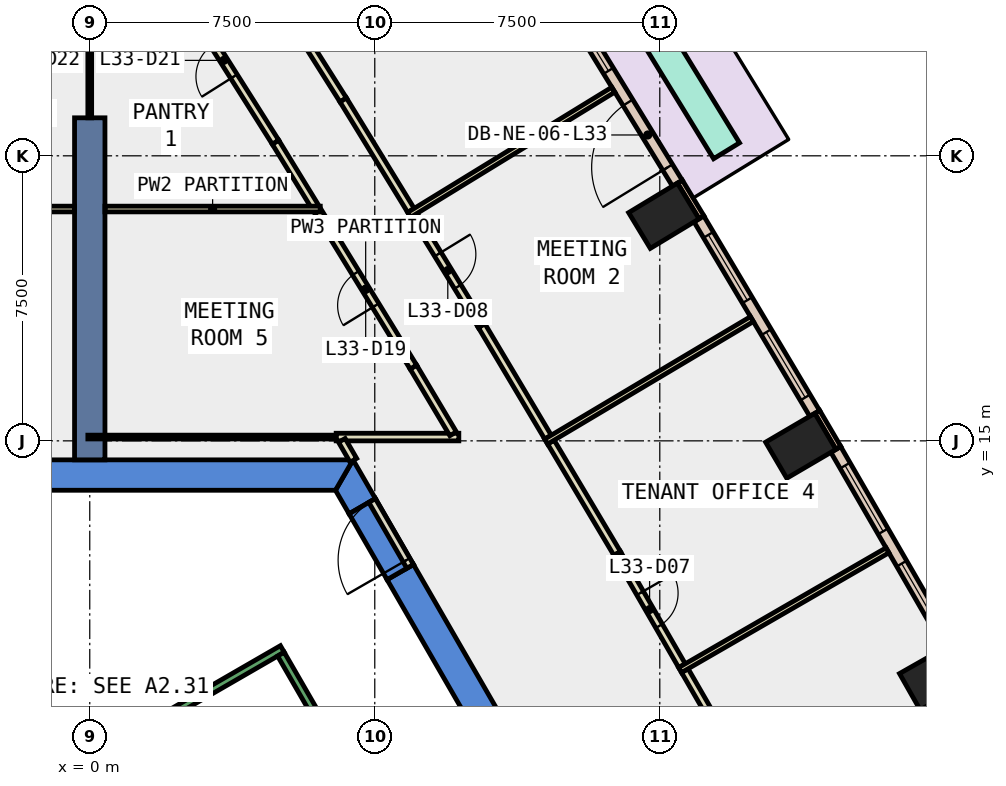
"""IFC4 building model, lengths in metres.
Left out: names, types, materials, properties, quantities, classifications, styles, units other than length and angle.
Written with IfcOpenShell. Run it as: python <this file> out.ifc"""

import sys

from ifc_helpers import new_model, si_unit, direction, frame, frame_2d, origin, origin_2d, place, context, subcontext, project, spatial, polyline, rectangle, outline, extrude, element, fill, save


model = new_model("IFC4")
c1 = context("Model", 3, precision=1e-05, world=origin(), true_north=direction((0.0, 1.0)))
c2 = subcontext(c1, "Body", "Model", "MODEL_VIEW")
j1 = project(units=[si_unit("LENGTHUNIT", "METRE"), si_unit("PLANEANGLEUNIT", "RADIAN")], contexts=[c1])
p1 = place(None, origin())
s1 = spatial("IfcSite", under=j1, at=p1, CompositionType="ELEMENT")
p2 = place(p1, origin())
s2 = spatial("IfcBuilding", under=s1, at=p2, CompositionType="ELEMENT")
p3 = place(p2, frame((0.0, 0.0, 150.8)))
s3 = spatial("IfcBuildingStorey", under=s2, at=p3, CompositionType="ELEMENT", Elevation=150.8)
for number, where, z_axis, x_axis in (
    (1, (22.232, 8.769, -0.4), (0.0, 0.0, 1.0), (-0.494, 0.869, 0.0)),
    (2, (18.71, 14.87, -0.4), (0.0, 0.0, 1.0), (-0.506, 0.863, 0.0)),
    (3, (15.107, 20.923, -0.4), (0.0, 0.0, 1.0), (-0.518, 0.855, 0.0)),
):
    element("IfcColumn", number, at=place(p3, frame(where, z_axis=z_axis, x_axis=x_axis)), inside=s3, PredefinedType="COLUMN", context=c2, shape_type="SweptSolid", body=[
        extrude(rectangle(XDim=1.1, YDim=1.5, at=origin_2d()), origin(), (0.0, 0.0, 1.0), 4.2),
    ])
p4 = place(p3, frame((0.0, 0.0, -0.4)))
e4 = element("IfcWall", 4, at=p4, inside=s3, PredefinedType="SHEAR", context=c2, shape_type="SweptSolid", body=[
    extrude(outline(polyline([(8.517, 11.748), (7.824, 11.348), (12.933, 2.5), (13.856, 2.5), (8.517, 11.748)])), origin(), (0.0, 0.0, 1.0), 4.2),
])
p5 = place(p3, frame((0.0, 0.0, -0.4)))
e5 = element("IfcWall", 5, at=p5, inside=s3, PredefinedType="SHEAR", context=c2, shape_type="SweptSolid", body=[
    extrude(outline(polyline([(6.824, 13.08), (7.517, 13.48), (6.928, 14.5), (6.466, 13.7), (6.824, 13.08)])), origin(), (0.0, 0.0, 1.0), 4.2),
])
p6 = place(p3, frame((0.0, 0.0, 3.6)))
e6 = element("IfcWall", 6, at=p6, inside=s3, PredefinedType="SHEAR", context=c2, shape_type="SweptSolid", body=[
    extrude(outline(polyline([(7.517, 13.48), (6.824, 13.08), (7.824, 11.348), (8.517, 11.748), (7.517, 13.48)])), origin(), (0.0, 0.0, 1.0), 0.2),
])
p7 = place(p3, frame((0.0, 0.0, -0.4)))
e7 = element("IfcWall", 7, at=p7, inside=s3, PredefinedType="SHEAR", context=c2, shape_type="SweptSolid", body=[
    extrude(outline(polyline([(6.928, 14.5), (-6.928, 14.5), (-6.466, 13.7), (6.466, 13.7), (6.928, 14.5)])), origin(), (0.0, 0.0, 1.0), 4.2),
])
p8 = place(p3, frame((0.0, 14.5, -0.4), z_axis=(0.0, 0.0, 1.0), x_axis=(0.0, 1.0, 0.0)))
e8 = element("IfcWall", 8, at=p8, inside=s3, PredefinedType="SHEAR", context=c2, shape_type="SweptSolid", body=[
    extrude(rectangle(XDim=9.0, YDim=0.8, at=frame_2d((4.5, 0.0))), origin(), (0.0, 0.0, 1.0), 4.2),
])
p9 = place(p3, frame((19.7, 14.813, 0.0), z_axis=(0.0, 0.0, 1.0), x_axis=(-0.506505715302, 0.862236603472, 0.0)))
e9 = element("IfcWall", 9, at=p9, inside=s3, PredefinedType="STANDARD", context=c2, shape_type="SweptSolid", body=[
    extrude(rectangle(XDim=1.099, YDim=0.15, at=frame_2d((0.55, 0.0))), origin(), (0.0, 0.0, 1.0), 3.8),
])
p10 = place(p3, frame((16.098, 20.88, 0.0), z_axis=(0.0, 0.0, 1.0), x_axis=(-0.517918067967, 0.85543022794, 0.0)))
e10 = element("IfcWall", 10, at=p10, inside=s3, PredefinedType="STANDARD", context=c2, shape_type="SweptSolid", body=[
    extrude(rectangle(XDim=1.1, YDim=0.15, at=frame_2d((0.55, 0.0))), origin(), (0.0, 0.0, 1.0), 3.8),
])
p11 = place(p3, frame((22.61, 9.615, 0.0), z_axis=(0.0, 0.0, 1.0), x_axis=(-0.500061823953, 0.865989706766, 0.0)))
e11 = element("IfcWall", 11, at=p11, inside=s3, PredefinedType="STANDARD", context=c2, shape_type="SweptSolid", body=[
    extrude(rectangle(XDim=5.957, YDim=0.3, at=frame_2d((2.979, 0.0))), origin(), (0.0, 0.0, 1.0), 3.8),
])
p12 = place(p11, frame((0.489, 0.0, 0.9)))
e12 = element("IfcOpeningElement", 12, at=p12, cuts=e11, PredefinedType="OPENING", context=c2, shape_type="SweptSolid", body=[
    extrude(rectangle(XDim=2.0, YDim=2.6, at=frame_2d((1.0, 1.3))), frame((0.0, 0.16, 0.0), z_axis=(0.0, -1.0, 0.0), x_axis=(1.0, 0.0, 0.0)), (0.0, 0.0, 1.0), 0.32),
])
p13 = place(p11, frame((3.468, 0.0, 0.9)))
e13 = element("IfcOpeningElement", 13, at=p13, cuts=e11, PredefinedType="OPENING", context=c2, shape_type="SweptSolid", body=[
    extrude(rectangle(XDim=2.0, YDim=2.6, at=frame_2d((1.0, 1.3))), frame((0.0, 0.16, 0.0), z_axis=(0.0, -1.0, 0.0), x_axis=(1.0, 0.0, 0.0)), (0.0, 0.0, 1.0), 0.32),
])
p14 = place(p3, frame((19.076, 15.721, 0.0), z_axis=(0.0, 0.0, 1.0), x_axis=(-0.511455040009, 0.859310038374, 0.0)))
e14 = element("IfcWall", 14, at=p14, inside=s3, PredefinedType="STANDARD", context=c2, shape_type="SweptSolid", body=[
    extrude(rectangle(XDim=5.957, YDim=0.3, at=frame_2d((2.979, 0.0))), origin(), (0.0, 0.0, 1.0), 3.8),
])
p15 = place(p14, frame((0.489, 0.0, 0.9)))
e15 = element("IfcOpeningElement", 15, at=p15, cuts=e14, PredefinedType="OPENING", context=c2, shape_type="SweptSolid", body=[
    extrude(rectangle(XDim=2.0, YDim=2.6, at=frame_2d((1.0, 1.3))), frame((0.0, 0.16, 0.0), z_axis=(0.0, -1.0, 0.0), x_axis=(1.0, 0.0, 0.0)), (0.0, 0.0, 1.0), 0.32),
])
p16 = place(p14, frame((3.468, 0.0, 0.9)))
e16 = element("IfcOpeningElement", 16, at=p16, cuts=e14, PredefinedType="OPENING", context=c2, shape_type="SweptSolid", body=[
    extrude(rectangle(XDim=2.0, YDim=2.6, at=frame_2d((1.0, 1.3))), frame((0.0, 0.16, 0.0), z_axis=(0.0, -1.0, 0.0), x_axis=(1.0, 0.0, 0.0)), (0.0, 0.0, 1.0), 0.32),
])
p17 = place(p3, frame((15.462, 21.779, 0.0), z_axis=(0.0, 0.0, 1.0), x_axis=(-0.522704272908, 0.852514072074, 0.0)))
e17 = element("IfcWall", 17, at=p17, inside=s3, PredefinedType="STANDARD", context=c2, shape_type="SweptSolid", body=[
    extrude(rectangle(XDim=5.958, YDim=0.3, at=frame_2d((2.979, 0.0))), origin(), (0.0, 0.0, 1.0), 3.8),
])
p18 = place(p17, frame((0.489, 0.0, 0.0)))
e18 = element("IfcOpeningElement", 18, at=p18, cuts=e17, PredefinedType="OPENING", context=c2, shape_type="SweptSolid", body=[
    extrude(rectangle(XDim=2.0, YDim=2.4, at=frame_2d((1.0, 1.2))), frame((0.0, 0.16, 0.0), z_axis=(0.0, -1.0, 0.0), x_axis=(1.0, 0.0, 0.0)), (0.0, 0.0, 1.0), 0.32),
])
p19 = place(p17, frame((3.468, 0.0, 0.9)))
e19 = element("IfcOpeningElement", 19, at=p19, cuts=e17, PredefinedType="OPENING", context=c2, shape_type="SweptSolid", body=[
    extrude(rectangle(XDim=2.0, YDim=2.6, at=frame_2d((1.0, 1.3))), frame((0.0, 0.16, 0.0), z_axis=(0.0, -1.0, 0.0), x_axis=(1.0, 0.0, 0.0)), (0.0, 0.0, 1.0), 0.32),
])
p20 = place(p3, frame((16.757, 22.632, 0.0), z_axis=(0.0, 0.0, 1.0), x_axis=(-0.52278978303, 0.852461637119, 0.0)))
e20 = element("IfcWall", 20, at=p20, inside=s3, PredefinedType="STANDARD", context=c2, shape_type="SweptSolid", body=[
    extrude(rectangle(XDim=5.857, YDim=0.8, at=frame_2d((2.929, 0.0))), origin(), (0.0, 0.0, 1.0), 0.8),
])
p21 = place(p3, frame((6.484, 15.1, 0.0), z_axis=(0.0, 0.0, 1.0), x_axis=(1.0, 0.0, 0.0)))
e21 = element("IfcWall", 21, at=p21, inside=s3, PredefinedType="PARTITIONING", context=c2, shape_type="SweptSolid", body=[
    extrude(rectangle(XDim=3.228, YDim=0.2, at=frame_2d((1.614, 0.0))), origin(), (0.0, 0.0, 1.0), 3.8),
])
p22 = place(p3, frame((9.561, 15.186, 0.0), z_axis=(0.0, 0.0, 1.0), x_axis=(-0.511399832047, 0.859342895346, 0.0)))
e22 = element("IfcWall", 22, at=p22, inside=s3, PredefinedType="PARTITIONING", context=c2, shape_type="SweptSolid", body=[
    extrude(rectangle(XDim=2.043, YDim=0.2, at=frame_2d((1.021, 0.0))), origin(), (0.0, 0.0, 1.0), 3.8),
])
p23 = place(p3, frame((8.516, 16.942, 0.0), z_axis=(0.0, 0.0, 1.0), x_axis=(-0.522865983217, 0.852414901086, 0.0)))
e23 = element("IfcWall", 23, at=p23, inside=s3, PredefinedType="PARTITIONING", context=c2, shape_type="SweptSolid", body=[
    extrude(rectangle(XDim=4.803, YDim=0.2, at=frame_2d((2.401, 0.0))), origin(), (0.0, 0.0, 1.0), 3.8),
])
p24 = place(p23, frame((1.901, 0.0, 0.0)))
e24 = element("IfcOpeningElement", 24, at=p24, cuts=e23, PredefinedType="OPENING", context=c2, shape_type="SweptSolid", body=[
    extrude(rectangle(XDim=1.0, YDim=2.1, at=frame_2d((0.5, 1.05))), frame((0.0, 0.11, 0.0), z_axis=(0.0, -1.0, 0.0), x_axis=(1.0, 0.0, 0.0)), (0.0, 0.0, 1.0), 0.22),
])
p25 = place(p3, frame((6.937, 14.488, 0.0), z_axis=(0.0, 0.0, 1.0), x_axis=(-0.499908430952, 0.866078264744, 0.0)))
e25 = element("IfcWall", 25, at=p25, inside=s3, PredefinedType="PARTITIONING", context=c2, shape_type="SweptSolid", body=[
    extrude(rectangle(XDim=0.606, YDim=0.2, at=frame_2d((0.303, 0.0))), origin(), (0.0, 0.0, 1.0), 3.8),
])
p26 = place(p3, frame((5.927, 21.164, 0.0), z_axis=(0.0, 0.0, 1.0), x_axis=(-0.522754838565, 0.852483066552, 0.0)))
e26 = element("IfcWall", 26, at=p26, inside=s3, PredefinedType="PARTITIONING", context=c2, shape_type="SweptSolid", body=[
    extrude(rectangle(XDim=1.99, YDim=0.2, at=frame_2d((0.995, 0.0))), origin(), (0.0, 0.0, 1.0), 3.8),
])
p27 = place(p3, frame((4.887, 22.86, 0.0), z_axis=(0.0, 0.0, 1.0), x_axis=(-0.534315942524, 0.845284847589, 0.0)))
e27 = element("IfcWall", 27, at=p27, inside=s3, PredefinedType="PARTITIONING", context=c2, shape_type="SweptSolid", body=[
    extrude(rectangle(XDim=5.091, YDim=0.2, at=frame_2d((2.545, 0.0))), origin(), (0.0, 0.0, 1.0), 3.8),
])
p28 = place(p27, frame((2.045, 0.0, 0.0)))
e28 = element("IfcOpeningElement", 28, at=p28, cuts=e27, PredefinedType="OPENING", context=c2, shape_type="SweptSolid", body=[
    extrude(rectangle(XDim=1.0, YDim=2.1, at=frame_2d((0.5, 1.05))), frame((0.0, 0.11, 0.0), z_axis=(0.0, -1.0, 0.0), x_axis=(1.0, 0.0, 0.0)), (0.0, 0.0, 1.0), 0.22),
])
p29 = place(p3, frame((15.659, 8.954, 0.0), z_axis=(0.0, 0.0, 1.0), x_axis=(0.50001992892, -0.866013897511, 0.0)))
e29 = element("IfcWall", 29, at=p29, inside=s3, PredefinedType="PARTITIONING", context=c2, shape_type="SweptSolid", body=[
    extrude(rectangle(XDim=3.41, YDim=0.2, at=frame_2d((1.705, 0.0))), origin(), (0.0, 0.0, 1.0), 3.8),
])
p30 = place(p3, frame((12.134, 14.968, 0.0), z_axis=(0.0, 0.0, 1.0), x_axis=(0.511545516492, -0.859256180983, 0.0)))
e30 = element("IfcWall", 30, at=p30, inside=s3, PredefinedType="PARTITIONING", context=c2, shape_type="SweptSolid", body=[
    extrude(rectangle(XDim=3.411, YDim=0.2, at=frame_2d((1.706, 0.0))), origin(), (0.0, 0.0, 1.0), 3.8),
])
p31 = place(p3, frame((13.879, 12.037, 0.0), z_axis=(0.0, 0.0, 1.0), x_axis=(0.50001992892, -0.866013897511, 0.0)))
e31 = element("IfcWall", 31, at=p31, inside=s3, PredefinedType="PARTITIONING", context=c2, shape_type="SweptSolid", body=[
    extrude(rectangle(XDim=3.41, YDim=0.2, at=frame_2d((1.705, 0.0))), origin(), (0.0, 0.0, 1.0), 3.8),
])
p32 = place(p31, frame((1.205, 0.0, 0.0)))
e32 = element("IfcOpeningElement", 32, at=p32, cuts=e31, PredefinedType="OPENING", context=c2, shape_type="SweptSolid", body=[
    extrude(rectangle(XDim=1.0, YDim=2.1, at=frame_2d((0.5, 1.05))), frame((0.0, 0.11, 0.0), z_axis=(0.0, -1.0, 0.0), x_axis=(1.0, 0.0, 0.0)), (0.0, 0.0, 1.0), 0.22),
])
p33 = place(p3, frame((8.53, 20.935, 0.0), z_axis=(0.0, 0.0, 1.0), x_axis=(0.522830634433, -0.852436582801, 0.0)))
e33 = element("IfcWall", 33, at=p33, inside=s3, PredefinedType="PARTITIONING", context=c2, shape_type="SweptSolid", body=[
    extrude(rectangle(XDim=3.41, YDim=0.2, at=frame_2d((1.705, 0.0))), origin(), (0.0, 0.0, 1.0), 3.8),
])
p34 = place(p33, frame((1.205, 0.0, 0.0)))
e34 = element("IfcOpeningElement", 34, at=p34, cuts=e33, PredefinedType="OPENING", context=c2, shape_type="SweptSolid", body=[
    extrude(rectangle(XDim=1.0, YDim=2.1, at=frame_2d((0.5, 1.05))), frame((0.0, 0.11, 0.0), z_axis=(0.0, -1.0, 0.0), x_axis=(1.0, 0.0, 0.0)), (0.0, 0.0, 1.0), 0.22),
])
p35 = place(p3, frame((10.313, 18.028, 0.0), z_axis=(0.0, 0.0, 1.0), x_axis=(0.511566898838, -0.859243450958, 0.0)))
e35 = element("IfcWall", 35, at=p35, inside=s3, PredefinedType="PARTITIONING", context=c2, shape_type="SweptSolid", body=[
    extrude(rectangle(XDim=3.411, YDim=0.2, at=frame_2d((1.706, 0.0))), origin(), (0.0, 0.0, 1.0), 3.8),
])
p36 = place(p3, frame((3.209, 29.446, 0.0), z_axis=(0.0, 0.0, 1.0), x_axis=(0.534253865926, -0.845324083854, 0.0)))
e36 = element("IfcWall", 36, at=p36, inside=s3, PredefinedType="PARTITIONING", context=c2, shape_type="SweptSolid", body=[
    extrude(rectangle(XDim=6.478, YDim=0.2, at=frame_2d((3.239, 0.0))), origin(), (0.0, 0.0, 1.0), 3.8),
])
p37 = place(p36, frame((2.739, 0.0, 0.0)))
e37 = element("IfcOpeningElement", 37, at=p37, cuts=e36, PredefinedType="OPENING", context=c2, shape_type="SweptSolid", body=[
    extrude(rectangle(XDim=1.0, YDim=2.1, at=frame_2d((0.5, 1.05))), frame((0.0, 0.11, 0.0), z_axis=(0.0, -1.0, 0.0), x_axis=(1.0, 0.0, 0.0)), (0.0, 0.0, 1.0), 0.22),
])
p38 = place(p3, frame((6.67, 23.97, 0.0), z_axis=(0.0, 0.0, 1.0), x_axis=(0.522622501212, -0.85256420358, 0.0)))
e38 = element("IfcWall", 38, at=p38, inside=s3, PredefinedType="PARTITIONING", context=c2, shape_type="SweptSolid", body=[
    extrude(rectangle(XDim=3.41, YDim=0.2, at=frame_2d((1.705, 0.0))), origin(), (0.0, 0.0, 1.0), 3.8),
])
p39 = place(p3, frame((6.484, 15.1, 0.0), z_axis=(0.0, 0.0, 1.0), x_axis=(-1.0, 0.0, 0.0)))
e39 = element("IfcWall", 39, at=p39, inside=s3, PredefinedType="PARTITIONING", context=c2, shape_type="SweptSolid", body=[
    extrude(rectangle(XDim=6.534, YDim=0.1, at=frame_2d((3.267, 0.0))), origin(), (0.0, 0.0, 1.0), 3.8),
])
for number, where, z_axis, x_axis in (
    (40, (0.4, 21.1, 0.0), (0.0, 0.0, 1.0), (1.0, 0.0, 0.0)),
    (41, (-6.066, 21.1, 0.0), (0.0, 0.0, 1.0), (1.0, 0.0, 0.0)),
):
    element("IfcWall", number, at=place(p3, frame(where, z_axis=z_axis, x_axis=x_axis)), inside=s3, PredefinedType="PARTITIONING", context=c2, shape_type="SweptSolid", body=[
        extrude(rectangle(XDim=5.666, YDim=0.15, at=frame_2d((2.833, 0.0))), origin(), (0.0, 0.0, 1.0), 3.8),
    ])
p40 = place(p3, frame((0.0, 23.5, 0.0), z_axis=(0.0, 0.0, 1.0), x_axis=(0.0, 1.0, 0.0)))
e42 = element("IfcWall", 42, at=p40, inside=s3, PredefinedType="PARTITIONING", context=c2, shape_type="SweptSolid", body=[
    extrude(rectangle(XDim=3.675, YDim=0.1, at=frame_2d((1.837, 0.0))), origin(), (0.0, 0.0, 1.0), 3.8),
])
p41 = place(p3, frame((15.535, 8.969, 0.0), z_axis=(0.0, 0.0, 1.0), x_axis=(0.865951968193, 0.500127172609, 0.0)))
e43 = element("IfcWall", 43, at=p41, inside=s3, PredefinedType="PARTITIONING", context=c2, shape_type="SweptSolid", body=[
    extrude(rectangle(XDim=6.301, YDim=0.15, at=frame_2d((3.15, 0.0))), origin(), (0.0, 0.0, 1.0), 3.8),
])
for number, where, z_axis, x_axis in (
    (44, (12.01, 14.981, 0.0), (0.0, 0.0, 1.0), (0.859, 0.511, 0.0)),
    (45, (8.406, 20.947, 0.0), (0.0, 0.0, 1.0), (0.853, 0.523, 0.0)),
):
    element("IfcWall", number, at=place(p3, frame(where, z_axis=z_axis, x_axis=x_axis)), inside=s3, PredefinedType="PARTITIONING", context=c2, shape_type="SweptSolid", body=[
        extrude(rectangle(XDim=6.3, YDim=0.15, at=frame_2d((3.15, 0.0))), origin(), (0.0, 0.0, 1.0), 3.8),
    ])
p42 = place(p3, frame((8.43, 11.698, 0.0), z_axis=(0.0, 0.0, 1.0), x_axis=(-0.50002537861, 0.866010750942, 0.0)))
e46 = element("IfcWall", 46, at=p42, inside=s3, PredefinedType="PARTITIONING", context=c2, shape_type="SweptSolid", body=[
    extrude(rectangle(XDim=2.0, YDim=0.2, at=frame_2d((1.0, 0.0))), origin(), (0.0, 0.0, 1.0), 2.4),
])
p43 = place(p42, frame((0.19, 0.0, 0.0)))
e47 = element("IfcOpeningElement", 47, at=p43, cuts=e46, PredefinedType="OPENING", context=c2, shape_type="SweptSolid", body=[
    extrude(rectangle(XDim=1.8, YDim=2.1, at=frame_2d((0.9, 1.05))), frame((0.0, 0.11, 0.0), z_axis=(0.0, -1.0, 0.0), x_axis=(1.0, 0.0, 0.0)), (0.0, 0.0, 1.0), 0.22),
])
p44 = place(p3, frame((1.256, 7.324, 0.0), z_axis=(0.0, 0.0, 1.0), x_axis=(0.866046073146, 0.499964197906, 0.0)))
e48 = element("IfcWall", 48, at=p44, inside=s3, PredefinedType="STANDARD", context=c2, shape_type="SweptSolid", body=[
    extrude(rectangle(XDim=4.4, YDim=0.2, at=frame_2d((2.2, 0.0))), origin(), (0.0, 0.0, 1.0), 3.8),
])
p45 = place(p3, frame((8.48, 3.412, 0.0), z_axis=(0.0, 0.0, 1.0), x_axis=(-0.499978703459, 0.866037698999, 0.0)))
e49 = element("IfcWall", 49, at=p45, inside=s3, PredefinedType="STANDARD", context=c2, shape_type="SweptSolid", body=[
    extrude(rectangle(XDim=6.9, YDim=0.2, at=frame_2d((3.45, 0.0))), origin(), (0.0, 0.0, 1.0), 3.8),
])
p46 = place(p12, origin())
e50 = element("IfcWindow", 50, at=p46, inside=s3, PartitioningType="SINGLE_PANEL", PredefinedType="WINDOW", context=c2, shape_type="SweptSolid", body=[
    extrude(rectangle(XDim=2.0, YDim=2.6, at=frame_2d((1.0, 1.3))), frame((0.0, 0.03, 0.0), z_axis=(0.0, -1.0, 0.0), x_axis=(1.0, 0.0, 0.0)), (0.0, 0.0, 1.0), 0.06),
])
fill(e12, e50)
p47 = place(p13, origin())
e51 = element("IfcWindow", 51, at=p47, inside=s3, PartitioningType="SINGLE_PANEL", PredefinedType="WINDOW", context=c2, shape_type="SweptSolid", body=[
    extrude(rectangle(XDim=2.0, YDim=2.6, at=frame_2d((1.0, 1.3))), frame((0.0, 0.03, 0.0), z_axis=(0.0, -1.0, 0.0), x_axis=(1.0, 0.0, 0.0)), (0.0, 0.0, 1.0), 0.06),
])
fill(e13, e51)
p48 = place(p15, origin())
e52 = element("IfcWindow", 52, at=p48, inside=s3, PartitioningType="SINGLE_PANEL", PredefinedType="WINDOW", context=c2, shape_type="SweptSolid", body=[
    extrude(rectangle(XDim=2.0, YDim=2.6, at=frame_2d((1.0, 1.3))), frame((0.0, 0.03, 0.0), z_axis=(0.0, -1.0, 0.0), x_axis=(1.0, 0.0, 0.0)), (0.0, 0.0, 1.0), 0.06),
])
fill(e15, e52)
p49 = place(p16, origin())
e53 = element("IfcWindow", 53, at=p49, inside=s3, PartitioningType="SINGLE_PANEL", PredefinedType="WINDOW", context=c2, shape_type="SweptSolid", body=[
    extrude(rectangle(XDim=2.0, YDim=2.6, at=frame_2d((1.0, 1.3))), frame((0.0, 0.03, 0.0), z_axis=(0.0, -1.0, 0.0), x_axis=(1.0, 0.0, 0.0)), (0.0, 0.0, 1.0), 0.06),
])
fill(e16, e53)
p50 = place(p18, origin())
e54 = element("IfcDoor", 54, at=p50, inside=s3, OperationType="SLIDING_TO_LEFT", PredefinedType="DOOR", context=c2, shape_type="SweptSolid", body=[
    extrude(rectangle(XDim=2.0, YDim=2.4, at=frame_2d((1.0, 1.2))), frame((0.0, 0.025, 0.0), z_axis=(0.0, -1.0, 0.0), x_axis=(1.0, 0.0, 0.0)), (0.0, 0.0, 1.0), 0.05),
])
fill(e18, e54)
p51 = place(p19, origin())
e55 = element("IfcWindow", 55, at=p51, inside=s3, PartitioningType="SINGLE_PANEL", PredefinedType="WINDOW", context=c2, shape_type="SweptSolid", body=[
    extrude(rectangle(XDim=2.0, YDim=2.6, at=frame_2d((1.0, 1.3))), frame((0.0, 0.03, 0.0), z_axis=(0.0, -1.0, 0.0), x_axis=(1.0, 0.0, 0.0)), (0.0, 0.0, 1.0), 0.06),
])
fill(e19, e55)
p52 = place(p32, origin())
e56 = element("IfcDoor", 56, at=p52, inside=s3, OperationType="SINGLE_SWING_LEFT", PredefinedType="DOOR", context=c2, shape_type="SweptSolid", body=[
    extrude(rectangle(XDim=1.0, YDim=2.1, at=frame_2d((0.5, 1.05))), frame((0.0, 0.025, 0.0), z_axis=(0.0, -1.0, 0.0), x_axis=(1.0, 0.0, 0.0)), (0.0, 0.0, 1.0), 0.05),
])
fill(e32, e56)
p53 = place(p34, origin())
e57 = element("IfcDoor", 57, at=p53, inside=s3, OperationType="SINGLE_SWING_LEFT", PredefinedType="DOOR", context=c2, shape_type="SweptSolid", body=[
    extrude(rectangle(XDim=1.0, YDim=2.1, at=frame_2d((0.5, 1.05))), frame((0.0, 0.025, 0.0), z_axis=(0.0, -1.0, 0.0), x_axis=(1.0, 0.0, 0.0)), (0.0, 0.0, 1.0), 0.05),
])
fill(e34, e57)
p54 = place(p24, origin())
e58 = element("IfcDoor", 58, at=p54, inside=s3, OperationType="SINGLE_SWING_LEFT", PredefinedType="DOOR", context=c2, shape_type="SweptSolid", body=[
    extrude(rectangle(XDim=1.0, YDim=2.1, at=frame_2d((0.5, 1.05))), frame((0.0, 0.025, 0.0), z_axis=(0.0, -1.0, 0.0), x_axis=(1.0, 0.0, 0.0)), (0.0, 0.0, 1.0), 0.05),
])
fill(e24, e58)
p55 = place(p28, origin())
e59 = element("IfcDoor", 59, at=p55, inside=s3, OperationType="SINGLE_SWING_LEFT", PredefinedType="DOOR", context=c2, shape_type="SweptSolid", body=[
    extrude(rectangle(XDim=1.0, YDim=2.1, at=frame_2d((0.5, 1.05))), frame((0.0, 0.025, 0.0), z_axis=(0.0, -1.0, 0.0), x_axis=(1.0, 0.0, 0.0)), (0.0, 0.0, 1.0), 0.05),
])
fill(e28, e59)
p56 = place(p43, origin())
e60 = element("IfcDoor", 60, at=p56, inside=s3, OperationType="DOUBLE_DOOR_SINGLE_SWING", PredefinedType="DOOR", context=c2, shape_type="SweptSolid", body=[
    extrude(rectangle(XDim=1.8, YDim=2.1, at=frame_2d((0.9, 1.05))), frame((0.0, 0.025, 0.0), z_axis=(0.0, -1.0, 0.0), x_axis=(1.0, 0.0, 0.0)), (0.0, 0.0, 1.0), 0.05),
])
fill(e47, e60)
save(model, sys.argv[1])
